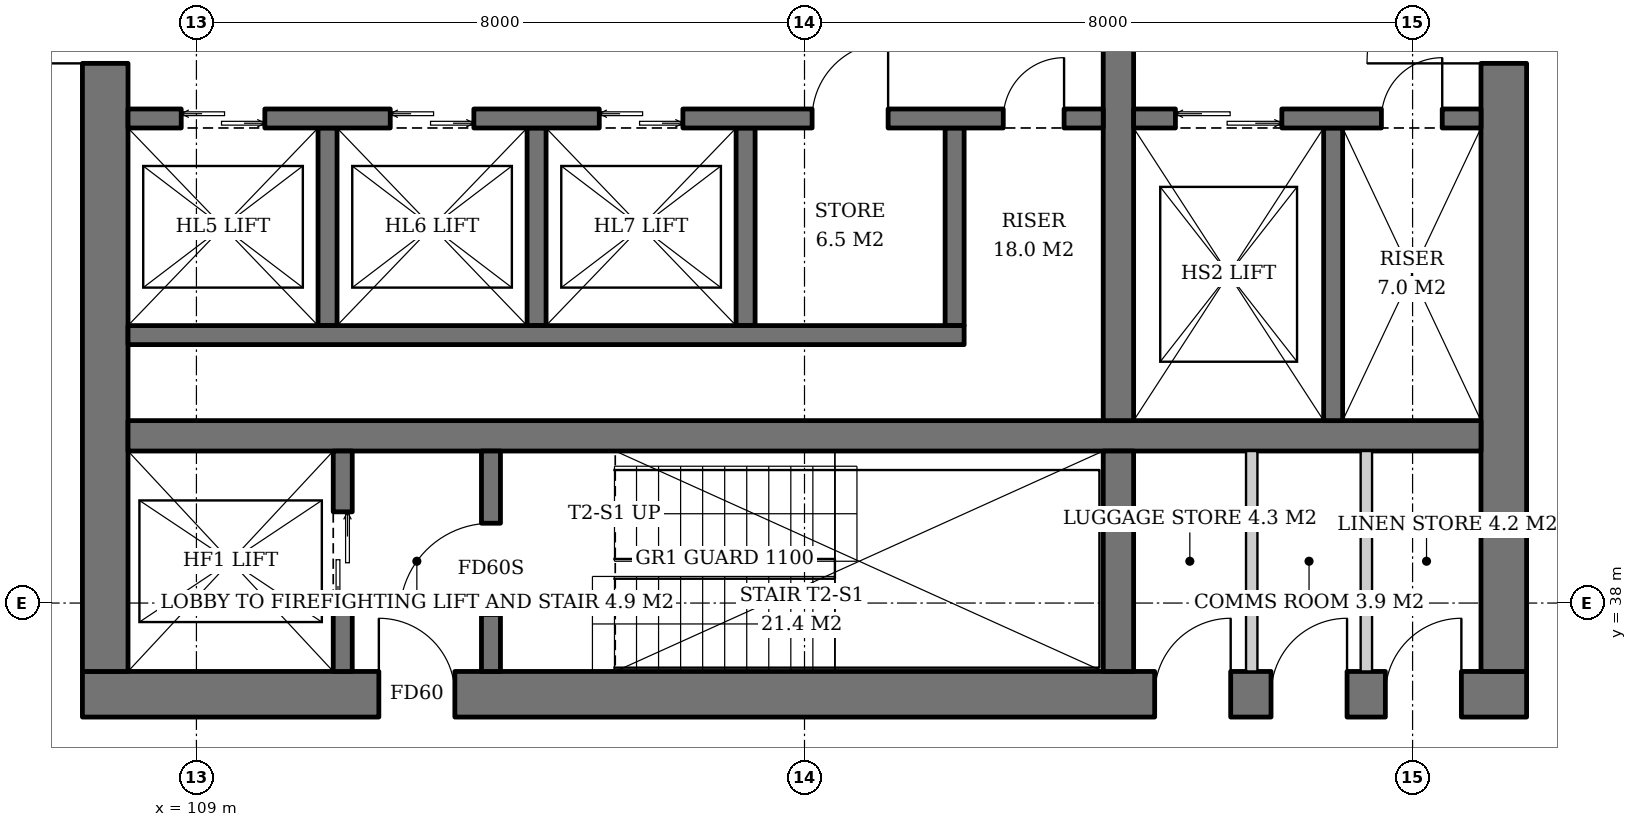
"""IFC4 building model, lengths in metres.
Left out: names, types, materials, properties, quantities, classifications, styles, units other than length and angle.
Written with IfcOpenShell. Run it as: python <this file> out.ifc"""

import sys

from ifc_helpers import new_model, si_unit, direction, frame, frame_2d, origin, place, context, subcontext, project, spatial, rectangle, extrude, element, fill, save


model = new_model("IFC4")
c1 = context("Model", 3, precision=1e-05, world=origin(), true_north=direction((0.0, 1.0)))
c2 = subcontext(c1, "Body", "Model", "MODEL_VIEW")
j1 = project(units=[si_unit("LENGTHUNIT", "METRE"), si_unit("PLANEANGLEUNIT", "RADIAN")], contexts=[c1])
p1 = place(None, origin())
s1 = spatial("IfcSite", under=j1, at=p1, CompositionType="ELEMENT")
p2 = place(p1, origin())
s2 = spatial("IfcBuilding", under=s1, at=p2, CompositionType="ELEMENT")
p3 = place(p2, frame((0.0, 0.0, 32.4)))
s3 = spatial("IfcBuildingStorey", under=s2, at=p3, CompositionType="ELEMENT", Elevation=32.4)
p4 = place(p3, frame((107.5, 36.8, 0.0), z_axis=(0.0, 0.0, 1.0), x_axis=(1.0, 0.0, 0.0)))
e1 = element("IfcWall", 1, at=p4, inside=s3, PredefinedType="SHEAR", context=c2, shape_type="SweptSolid", body=[
    extrude(rectangle(XDim=19.0, YDim=0.6, at=frame_2d((9.5, 0.0))), origin(), (0.0, 0.0, 1.0), 3.8),
])
p5 = place(p4, frame((3.9, 0.0, 0.0)))
e2 = element("IfcOpeningElement", 2, at=p5, cuts=e1, PredefinedType="OPENING", context=c2, shape_type="SweptSolid", body=[
    extrude(rectangle(XDim=1.0, YDim=2.1, at=frame_2d((0.5, 1.05))), frame((0.0, 0.31, 0.0), z_axis=(0.0, -1.0, 0.0), x_axis=(1.0, 0.0, 0.0)), (0.0, 0.0, 1.0), 0.62),
])
p6 = place(p4, frame((14.107, 0.0, 0.0)))
e3 = element("IfcOpeningElement", 3, at=p6, cuts=e1, PredefinedType="OPENING", context=c2, shape_type="SweptSolid", body=[
    extrude(rectangle(XDim=1.0, YDim=2.1, at=frame_2d((0.5, 1.05))), frame((0.0, 0.31, 0.0), z_axis=(0.0, -1.0, 0.0), x_axis=(1.0, 0.0, 0.0)), (0.0, 0.0, 1.0), 0.62),
])
p7 = place(p4, frame((15.638, 0.0, 0.0)))
e4 = element("IfcOpeningElement", 4, at=p7, cuts=e1, PredefinedType="OPENING", context=c2, shape_type="SweptSolid", body=[
    extrude(rectangle(XDim=1.0, YDim=2.1, at=frame_2d((0.5, 1.05))), frame((0.0, 0.31, 0.0), z_axis=(0.0, -1.0, 0.0), x_axis=(1.0, 0.0, 0.0)), (0.0, 0.0, 1.0), 0.62),
])
p8 = place(p4, frame((17.142, 0.0, 0.0)))
e5 = element("IfcOpeningElement", 5, at=p8, cuts=e1, PredefinedType="OPENING", context=c2, shape_type="SweptSolid", body=[
    extrude(rectangle(XDim=1.0, YDim=2.1, at=frame_2d((0.5, 1.05))), frame((0.0, 0.31, 0.0), z_axis=(0.0, -1.0, 0.0), x_axis=(1.0, 0.0, 0.0)), (0.0, 0.0, 1.0), 0.62),
])
p9 = place(p3, frame((107.8, 37.1, 0.0), z_axis=(0.0, 0.0, 1.0), x_axis=(0.0, 1.0, 0.0)))
e6 = element("IfcWall", 6, at=p9, inside=s3, PredefinedType="SHEAR", context=c2, shape_type="SweptSolid", body=[
    extrude(rectangle(XDim=17.8, YDim=0.6, at=frame_2d((8.9, 0.0))), origin(), (0.0, 0.0, 1.0), 3.8),
])
p10 = place(p9, frame((8.0, 0.0, 0.0)))
e7 = element("IfcOpeningElement", 7, at=p10, cuts=e6, PredefinedType="OPENING", context=c2, shape_type="SweptSolid", body=[
    extrude(rectangle(XDim=1.8, YDim=2.4, at=frame_2d((0.9, 1.2))), frame((0.0, 0.31, 0.0), z_axis=(0.0, -1.0, 0.0), x_axis=(1.0, 0.0, 0.0)), (0.0, 0.0, 1.0), 0.62),
])
p11 = place(p3, frame((126.2, 37.1, 0.0), z_axis=(0.0, 0.0, 1.0), x_axis=(0.0, 1.0, 0.0)))
e8 = element("IfcWall", 8, at=p11, inside=s3, PredefinedType="SHEAR", context=c2, shape_type="SweptSolid", body=[
    extrude(rectangle(XDim=17.8, YDim=0.6, at=frame_2d((8.9, 0.0))), origin(), (0.0, 0.0, 1.0), 3.8),
])
p12 = place(p11, frame((8.0, 0.0, 0.0)))
e9 = element("IfcOpeningElement", 9, at=p12, cuts=e8, PredefinedType="OPENING", context=c2, shape_type="SweptSolid", body=[
    extrude(rectangle(XDim=1.8, YDim=2.4, at=frame_2d((0.9, 1.2))), frame((0.0, 0.31, 0.0), z_axis=(0.0, -1.0, 0.0), x_axis=(1.0, 0.0, 0.0)), (0.0, 0.0, 1.0), 0.62),
])
p13 = place(p3, frame((108.1, 40.2, 0.0), z_axis=(0.0, 0.0, 1.0), x_axis=(1.0, 0.0, 0.0)))
e10 = element("IfcWall", 10, at=p13, inside=s3, PredefinedType="SHEAR", context=c2, shape_type="SweptSolid", body=[
    extrude(rectangle(XDim=17.8, YDim=0.4, at=frame_2d((8.9, 0.0))), origin(), (0.0, 0.0, 1.0), 3.8),
])
p14 = place(p3, frame((121.13, 37.1, 0.0), z_axis=(0.0, 0.0, 1.0), x_axis=(0.0, 1.0, 0.0)))
e11 = element("IfcWall", 11, at=p14, inside=s3, PredefinedType="SHEAR", context=c2, shape_type="SweptSolid", body=[
    extrude(rectangle(XDim=2.9, YDim=0.4, at=frame_2d((1.45, 0.0))), origin(), (0.0, 0.0, 1.0), 3.8),
])
p15 = place(p3, frame((121.13, 40.4, 0.0), z_axis=(0.0, 0.0, 1.0), x_axis=(0.0, 1.0, 0.0)))
e12 = element("IfcWall", 12, at=p15, inside=s3, PredefinedType="SHEAR", context=c2, shape_type="SweptSolid", body=[
    extrude(rectangle(XDim=11.2, YDim=0.4, at=frame_2d((5.6, 0.0))), origin(), (0.0, 0.0, 1.0), 3.8),
])
p16 = place(p3, frame((110.925, 37.1, 0.0), z_axis=(0.0, 0.0, 1.0), x_axis=(0.0, 1.0, 0.0)))
e13 = element("IfcWall", 13, at=p16, inside=s3, PredefinedType="SHEAR", context=c2, shape_type="SweptSolid", body=[
    extrude(rectangle(XDim=2.9, YDim=0.25, at=frame_2d((1.45, 0.0))), origin(), (0.0, 0.0, 1.0), 3.8),
])
p17 = place(p16, frame((0.8, 0.0, 0.0)))
e14 = element("IfcOpeningElement", 14, at=p17, cuts=e13, PredefinedType="OPENING", context=c2, shape_type="SweptSolid", body=[
    extrude(rectangle(XDim=1.3, YDim=2.2, at=frame_2d((0.65, 1.1))), frame((0.0, 0.135, 0.0), z_axis=(0.0, -1.0, 0.0), x_axis=(1.0, 0.0, 0.0)), (0.0, 0.0, 1.0), 0.27),
])
p18 = place(p3, frame((112.875, 37.1, 0.0), z_axis=(0.0, 0.0, 1.0), x_axis=(0.0, 1.0, 0.0)))
e15 = element("IfcWall", 15, at=p18, inside=s3, PredefinedType="SHEAR", context=c2, shape_type="SweptSolid", body=[
    extrude(rectangle(XDim=2.9, YDim=0.25, at=frame_2d((1.45, 0.0))), origin(), (0.0, 0.0, 1.0), 3.8),
])
p19 = place(p18, frame((0.75, 0.0, 0.0)))
e16 = element("IfcOpeningElement", 16, at=p19, cuts=e15, PredefinedType="OPENING", context=c2, shape_type="SweptSolid", body=[
    extrude(rectangle(XDim=1.2, YDim=2.1, at=frame_2d((0.6, 1.05))), frame((0.0, 0.135, 0.0), z_axis=(0.0, -1.0, 0.0), x_axis=(1.0, 0.0, 0.0)), (0.0, 0.0, 1.0), 0.27),
])
for number, where, z_axis, x_axis in (
    (17, (110.725, 44.25, 0.0), (0.0, 0.0, 1.0), (0.0, -1.0, 0.0)),
    (18, (113.475, 44.25, 0.0), (0.0, 0.0, 1.0), (0.0, -1.0, 0.0)),
    (19, (116.225, 44.25, 0.0), (0.0, 0.0, 1.0), (0.0, -1.0, 0.0)),
    (20, (118.975, 44.25, 0.0), (0.0, 0.0, 1.0), (0.0, -1.0, 0.0)),
):
    element("IfcWall", number, at=place(p3, frame(where, z_axis=z_axis, x_axis=x_axis)), inside=s3, PredefinedType="SHEAR", context=c2, shape_type="SweptSolid", body=[
        extrude(rectangle(XDim=2.6, YDim=0.25, at=frame_2d((1.3, 0.0))), origin(), (0.0, 0.0, 1.0), 3.8),
    ])
p20 = place(p3, frame((108.1, 41.525, 0.0), z_axis=(0.0, 0.0, 1.0), x_axis=(1.0, 0.0, 0.0)))
e21 = element("IfcWall", 21, at=p20, inside=s3, PredefinedType="SHEAR", context=c2, shape_type="SweptSolid", body=[
    extrude(rectangle(XDim=11.0, YDim=0.25, at=frame_2d((5.5, 0.0))), origin(), (0.0, 0.0, 1.0), 3.8),
])
p21 = place(p3, frame((108.1, 44.375, 0.0), z_axis=(0.0, 0.0, 1.0), x_axis=(1.0, 0.0, 0.0)))
e22 = element("IfcWall", 22, at=p21, inside=s3, PredefinedType="SHEAR", context=c2, shape_type="SweptSolid", body=[
    extrude(rectangle(XDim=12.83, YDim=0.25, at=frame_2d((6.415, 0.0))), origin(), (0.0, 0.0, 1.0), 3.8),
])
p22 = place(p21, frame((0.7, 0.0, 0.0)))
e23 = element("IfcOpeningElement", 23, at=p22, cuts=e22, PredefinedType="OPENING", context=c2, shape_type="SweptSolid", body=[
    extrude(rectangle(XDim=1.1, YDim=2.2, at=frame_2d((0.55, 1.1))), frame((0.0, 0.135, 0.0), z_axis=(0.0, -1.0, 0.0), x_axis=(1.0, 0.0, 0.0)), (0.0, 0.0, 1.0), 0.27),
])
p23 = place(p21, frame((3.45, 0.0, 0.0)))
e24 = element("IfcOpeningElement", 24, at=p23, cuts=e22, PredefinedType="OPENING", context=c2, shape_type="SweptSolid", body=[
    extrude(rectangle(XDim=1.1, YDim=2.2, at=frame_2d((0.55, 1.1))), frame((0.0, 0.135, 0.0), z_axis=(0.0, -1.0, 0.0), x_axis=(1.0, 0.0, 0.0)), (0.0, 0.0, 1.0), 0.27),
])
p24 = place(p21, frame((6.2, 0.0, 0.0)))
e25 = element("IfcOpeningElement", 25, at=p24, cuts=e22, PredefinedType="OPENING", context=c2, shape_type="SweptSolid", body=[
    extrude(rectangle(XDim=1.1, YDim=2.2, at=frame_2d((0.55, 1.1))), frame((0.0, 0.135, 0.0), z_axis=(0.0, -1.0, 0.0), x_axis=(1.0, 0.0, 0.0)), (0.0, 0.0, 1.0), 0.27),
])
p25 = place(p21, frame((9.0, 0.0, 0.0)))
e26 = element("IfcOpeningElement", 26, at=p25, cuts=e22, PredefinedType="OPENING", context=c2, shape_type="SweptSolid", body=[
    extrude(rectangle(XDim=1.0, YDim=2.1, at=frame_2d((0.5, 1.05))), frame((0.0, 0.135, 0.0), z_axis=(0.0, -1.0, 0.0), x_axis=(1.0, 0.0, 0.0)), (0.0, 0.0, 1.0), 0.27),
])
p26 = place(p21, frame((11.515, 0.0, 0.0)))
e27 = element("IfcOpeningElement", 27, at=p26, cuts=e22, PredefinedType="OPENING", context=c2, shape_type="SweptSolid", body=[
    extrude(rectangle(XDim=0.8, YDim=2.0, at=frame_2d((0.4, 1.0))), frame((0.0, 0.135, 0.0), z_axis=(0.0, -1.0, 0.0), x_axis=(1.0, 0.0, 0.0)), (0.0, 0.0, 1.0), 0.27),
])
p27 = place(p3, frame((123.955, 44.25, 0.0), z_axis=(0.0, 0.0, 1.0), x_axis=(0.0, -1.0, 0.0)))
e28 = element("IfcWall", 28, at=p27, inside=s3, PredefinedType="SHEAR", context=c2, shape_type="SweptSolid", body=[
    extrude(rectangle(XDim=3.85, YDim=0.25, at=frame_2d((1.925, 0.0))), origin(), (0.0, 0.0, 1.0), 3.8),
])
p28 = place(p3, frame((121.33, 44.375, 0.0), z_axis=(0.0, 0.0, 1.0), x_axis=(1.0, 0.0, 0.0)))
e29 = element("IfcWall", 29, at=p28, inside=s3, PredefinedType="SHEAR", context=c2, shape_type="SweptSolid", body=[
    extrude(rectangle(XDim=4.57, YDim=0.25, at=frame_2d((2.285, 0.0))), origin(), (0.0, 0.0, 1.0), 3.8),
])
p29 = place(p28, frame((0.55, 0.0, 0.0)))
e30 = element("IfcOpeningElement", 30, at=p29, cuts=e29, PredefinedType="OPENING", context=c2, shape_type="SweptSolid", body=[
    extrude(rectangle(XDim=1.4, YDim=2.4, at=frame_2d((0.7, 1.2))), frame((0.0, 0.135, 0.0), z_axis=(0.0, -1.0, 0.0), x_axis=(1.0, 0.0, 0.0)), (0.0, 0.0, 1.0), 0.27),
])
p30 = place(p28, frame((3.26, 0.0, 0.0)))
e31 = element("IfcOpeningElement", 31, at=p30, cuts=e29, PredefinedType="OPENING", context=c2, shape_type="SweptSolid", body=[
    extrude(rectangle(XDim=0.8, YDim=2.0, at=frame_2d((0.4, 1.0))), frame((0.0, 0.135, 0.0), z_axis=(0.0, -1.0, 0.0), x_axis=(1.0, 0.0, 0.0)), (0.0, 0.0, 1.0), 0.27),
])
for number, where, z_axis, x_axis in (
    (32, (122.884, 37.1, 0.0), (0.0, 0.0, 1.0), (0.0, 1.0, 0.0)),
    (33, (124.392, 37.1, 0.0), (0.0, 0.0, 1.0), (0.0, 1.0, 0.0)),
):
    element("IfcWall", number, at=place(p3, frame(where, z_axis=z_axis, x_axis=x_axis)), inside=s3, PredefinedType="SOLIDWALL", context=c2, shape_type="SweptSolid", body=[
        extrude(rectangle(XDim=2.9, YDim=0.15, at=frame_2d((1.45, 0.0))), origin(), (0.0, 0.0, 1.0), 3.6),
    ])
p31 = place(p17, origin())
e34 = element("IfcDoor", 34, at=p31, inside=s3, OperationType="DOUBLE_DOOR_SLIDING", PredefinedType="DOOR", context=c2, shape_type="SweptSolid", body=[
    extrude(rectangle(XDim=1.3, YDim=2.2, at=frame_2d((0.65, 1.1))), frame((0.0, 0.025, 0.0), z_axis=(0.0, -1.0, 0.0), x_axis=(1.0, 0.0, 0.0)), (0.0, 0.0, 1.0), 0.05),
])
fill(e14, e34)
p32 = place(p19, origin())
e35 = element("IfcDoor", 35, at=p32, inside=s3, OperationType="SINGLE_SWING_LEFT", PredefinedType="DOOR", context=c2, shape_type="SweptSolid", body=[
    extrude(rectangle(XDim=1.2, YDim=2.1, at=frame_2d((0.6, 1.05))), frame((0.0, 0.025, 0.0), z_axis=(0.0, -1.0, 0.0), x_axis=(1.0, 0.0, 0.0)), (0.0, 0.0, 1.0), 0.05),
])
fill(e16, e35)
p33 = place(p22, origin())
e36 = element("IfcDoor", 36, at=p33, inside=s3, OperationType="DOUBLE_DOOR_SLIDING", PredefinedType="DOOR", context=c2, shape_type="SweptSolid", body=[
    extrude(rectangle(XDim=1.1, YDim=2.2, at=frame_2d((0.55, 1.1))), frame((0.0, 0.025, 0.0), z_axis=(0.0, -1.0, 0.0), x_axis=(1.0, 0.0, 0.0)), (0.0, 0.0, 1.0), 0.05),
])
fill(e23, e36)
p34 = place(p23, origin())
e37 = element("IfcDoor", 37, at=p34, inside=s3, OperationType="DOUBLE_DOOR_SLIDING", PredefinedType="DOOR", context=c2, shape_type="SweptSolid", body=[
    extrude(rectangle(XDim=1.1, YDim=2.2, at=frame_2d((0.55, 1.1))), frame((0.0, 0.025, 0.0), z_axis=(0.0, -1.0, 0.0), x_axis=(1.0, 0.0, 0.0)), (0.0, 0.0, 1.0), 0.05),
])
fill(e24, e37)
p35 = place(p24, origin())
e38 = element("IfcDoor", 38, at=p35, inside=s3, OperationType="DOUBLE_DOOR_SLIDING", PredefinedType="DOOR", context=c2, shape_type="SweptSolid", body=[
    extrude(rectangle(XDim=1.1, YDim=2.2, at=frame_2d((0.55, 1.1))), frame((0.0, 0.025, 0.0), z_axis=(0.0, -1.0, 0.0), x_axis=(1.0, 0.0, 0.0)), (0.0, 0.0, 1.0), 0.05),
])
fill(e25, e38)
p36 = place(p25, origin())
e39 = element("IfcDoor", 39, at=p36, inside=s3, OperationType="SINGLE_SWING_RIGHT", PredefinedType="DOOR", context=c2, shape_type="SweptSolid", body=[
    extrude(rectangle(XDim=1.0, YDim=2.1, at=frame_2d((0.5, 1.05))), frame((0.0, 0.025, 0.0), z_axis=(0.0, -1.0, 0.0), x_axis=(1.0, 0.0, 0.0)), (0.0, 0.0, 1.0), 0.05),
])
fill(e26, e39)
p37 = place(p26, origin())
e40 = element("IfcDoor", 40, at=p37, inside=s3, OperationType="SINGLE_SWING_RIGHT", PredefinedType="DOOR", context=c2, shape_type="SweptSolid", body=[
    extrude(rectangle(XDim=0.8, YDim=2.0, at=frame_2d((0.4, 1.0))), frame((0.0, 0.025, 0.0), z_axis=(0.0, -1.0, 0.0), x_axis=(1.0, 0.0, 0.0)), (0.0, 0.0, 1.0), 0.05),
])
fill(e27, e40)
p38 = place(p29, origin())
e41 = element("IfcDoor", 41, at=p38, inside=s3, OperationType="DOUBLE_DOOR_SLIDING", PredefinedType="DOOR", context=c2, shape_type="SweptSolid", body=[
    extrude(rectangle(XDim=1.4, YDim=2.4, at=frame_2d((0.7, 1.2))), frame((0.0, 0.025, 0.0), z_axis=(0.0, -1.0, 0.0), x_axis=(1.0, 0.0, 0.0)), (0.0, 0.0, 1.0), 0.05),
])
fill(e30, e41)
p39 = place(p30, origin())
e42 = element("IfcDoor", 42, at=p39, inside=s3, OperationType="SINGLE_SWING_RIGHT", PredefinedType="DOOR", context=c2, shape_type="SweptSolid", body=[
    extrude(rectangle(XDim=0.8, YDim=2.0, at=frame_2d((0.4, 1.0))), frame((0.0, 0.025, 0.0), z_axis=(0.0, -1.0, 0.0), x_axis=(1.0, 0.0, 0.0)), (0.0, 0.0, 1.0), 0.05),
])
fill(e31, e42)
p40 = place(p5, origin())
e43 = element("IfcDoor", 43, at=p40, inside=s3, OperationType="SINGLE_SWING_LEFT", PredefinedType="DOOR", context=c2, shape_type="SweptSolid", body=[
    extrude(rectangle(XDim=1.0, YDim=2.1, at=frame_2d((0.5, 1.05))), frame((0.0, 0.025, 0.0), z_axis=(0.0, -1.0, 0.0), x_axis=(1.0, 0.0, 0.0)), (0.0, 0.0, 1.0), 0.05),
])
fill(e2, e43)
p41 = place(p10, origin())
e44 = element("IfcDoor", 44, at=p41, inside=s3, OperationType="DOUBLE_DOOR_SINGLE_SWING", PredefinedType="DOOR", context=c2, shape_type="SweptSolid", body=[
    extrude(rectangle(XDim=1.8, YDim=2.4, at=frame_2d((0.9, 1.2))), frame((0.0, 0.025, 0.0), z_axis=(0.0, -1.0, 0.0), x_axis=(1.0, 0.0, 0.0)), (0.0, 0.0, 1.0), 0.05),
])
fill(e7, e44)
p42 = place(p12, origin())
e45 = element("IfcDoor", 45, at=p42, inside=s3, OperationType="DOUBLE_DOOR_SINGLE_SWING", PredefinedType="DOOR", context=c2, shape_type="SweptSolid", body=[
    extrude(rectangle(XDim=1.8, YDim=2.4, at=frame_2d((0.9, 1.2))), frame((0.0, 0.025, 0.0), z_axis=(0.0, -1.0, 0.0), x_axis=(1.0, 0.0, 0.0)), (0.0, 0.0, 1.0), 0.05),
])
fill(e9, e45)
p43 = place(p6, origin())
e46 = element("IfcDoor", 46, at=p43, inside=s3, OperationType="SINGLE_SWING_RIGHT", PredefinedType="DOOR", context=c2, shape_type="SweptSolid", body=[
    extrude(rectangle(XDim=1.0, YDim=2.1, at=frame_2d((0.5, 1.05))), frame((0.0, 0.29, 0.0), z_axis=(0.0, -1.0, 0.0), x_axis=(1.0, 0.0, 0.0)), (0.0, 0.0, 1.0), 0.05),
])
fill(e3, e46)
p44 = place(p7, origin())
e47 = element("IfcDoor", 47, at=p44, inside=s3, OperationType="SINGLE_SWING_RIGHT", PredefinedType="DOOR", context=c2, shape_type="SweptSolid", body=[
    extrude(rectangle(XDim=1.0, YDim=2.1, at=frame_2d((0.5, 1.05))), frame((0.0, 0.29, 0.0), z_axis=(0.0, -1.0, 0.0), x_axis=(1.0, 0.0, 0.0)), (0.0, 0.0, 1.0), 0.05),
])
fill(e4, e47)
p45 = place(p8, origin())
e48 = element("IfcDoor", 48, at=p45, inside=s3, OperationType="SINGLE_SWING_RIGHT", PredefinedType="DOOR", context=c2, shape_type="SweptSolid", body=[
    extrude(rectangle(XDim=1.0, YDim=2.1, at=frame_2d((0.5, 1.05))), frame((0.0, 0.29, 0.0), z_axis=(0.0, -1.0, 0.0), x_axis=(1.0, 0.0, 0.0)), (0.0, 0.0, 1.0), 0.05),
])
fill(e5, e48)
save(model, sys.argv[1])
